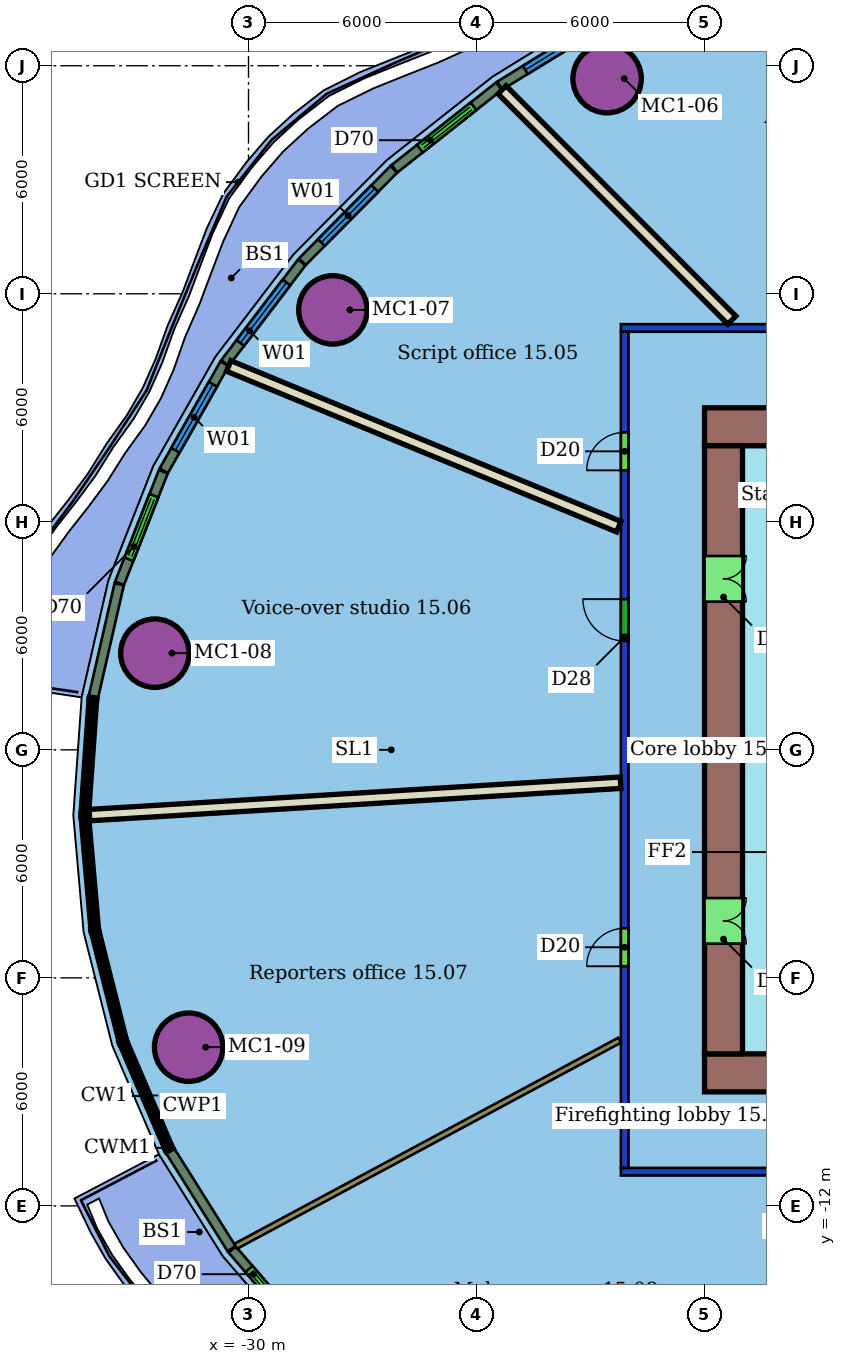
"""IFC4 building model, lengths in metres.
Left out: names, types, materials, properties, quantities, classifications, styles, units other than length and angle.
Written with IfcOpenShell. Run it as: python <this file> out.ifc"""

import sys

from ifc_helpers import new_model, si_unit, direction, frame, frame_2d, origin, origin_2d, place, context, subcontext, project, spatial, rectangle, hollow_circle, extrude, element, fill, save


model = new_model("IFC4")
c1 = context("Model", 3, precision=1e-05, world=origin(), true_north=direction((0.0, 1.0)))
c2 = subcontext(c1, "Body", "Model", "MODEL_VIEW")
j1 = project(units=[si_unit("LENGTHUNIT", "METRE"), si_unit("PLANEANGLEUNIT", "RADIAN")], contexts=[c1])
p1 = place(None, origin())
s1 = spatial("IfcSite", under=j1, at=p1, CompositionType="ELEMENT")
p2 = place(p1, origin())
s2 = spatial("IfcBuilding", under=s1, at=p2, CompositionType="ELEMENT")
p3 = place(p2, frame((0.0, 0.0, 73.0)))
s3 = spatial("IfcBuildingStorey", under=s2, at=p3, CompositionType="ELEMENT", Elevation=73.0)
for number, where, z_axis, x_axis in (
    (1, (-20.563, 17.66, 0.0), (0.0, 0.0, 1.0), (1.0, 0.0, 0.0)),
    (2, (-27.78, 11.576, 0.0), (0.0, 0.0, 1.0), (1.0, 0.0, 0.0)),
    (3, (-32.464, 2.543, 0.0), (0.0, 0.0, 1.0), (1.0, 0.0, 0.0)),
    (4, (-31.575, -7.824, 0.0), (0.0, 0.0, 1.0), (1.0, 0.0, 0.0)),
):
    element("IfcColumn", number, at=place(p3, frame(where, z_axis=z_axis, x_axis=x_axis)), inside=s3, PredefinedType="COLUMN", context=c2, shape_type="SweptSolid", body=[
        extrude(hollow_circle(Radius=0.9, WallThickness=0.06, at=origin_2d()), origin(), (0.0, 0.0, 1.0), 3.55),
    ])
p4 = place(p3, frame((8.2, -11.1, 0.0), z_axis=(0.0, 0.0, 1.0), x_axis=(-1.0, 0.0, 0.0)))
e5 = element("IfcWall", 5, at=p4, inside=s3, PredefinedType="PARTITIONING", context=c2, shape_type="SweptSolid", body=[
    extrude(rectangle(XDim=28.4, YDim=0.2, at=frame_2d((14.2, 0.0))), origin(), (0.0, 0.0, 1.0), 2.85),
])
p5 = place(p4, frame((23.619, 0.0, 0.0)))
e6 = element("IfcOpeningElement", 6, at=p5, cuts=e5, PredefinedType="OPENING", context=c2, shape_type="SweptSolid", body=[
    extrude(rectangle(XDim=0.9, YDim=2.1, at=frame_2d((0.45, 1.05))), frame((0.0, 0.11, 0.0), z_axis=(0.0, -1.0, 0.0), x_axis=(1.0, 0.0, 0.0)), (0.0, 0.0, 1.0), 0.22),
])
p6 = place(p4, frame((18.435, 0.0, 0.0)))
e7 = element("IfcOpeningElement", 7, at=p6, cuts=e5, PredefinedType="OPENING", context=c2, shape_type="SweptSolid", body=[
    extrude(rectangle(XDim=1.1, YDim=2.1, at=frame_2d((0.55, 1.05))), frame((0.0, 0.11, 0.0), z_axis=(0.0, -1.0, 0.0), x_axis=(1.0, 0.0, 0.0)), (0.0, 0.0, 1.0), 0.22),
])
p7 = place(p4, frame((9.94, 0.0, 0.0)))
e8 = element("IfcOpeningElement", 8, at=p7, cuts=e5, PredefinedType="OPENING", context=c2, shape_type="SweptSolid", body=[
    extrude(rectangle(XDim=1.0, YDim=2.1, at=frame_2d((0.5, 1.05))), frame((0.0, 0.11, 0.0), z_axis=(0.0, -1.0, 0.0), x_axis=(1.0, 0.0, 0.0)), (0.0, 0.0, 1.0), 0.22),
])
p8 = place(p4, frame((4.945, 0.0, 0.0)))
e9 = element("IfcOpeningElement", 9, at=p8, cuts=e5, PredefinedType="OPENING", context=c2, shape_type="SweptSolid", body=[
    extrude(rectangle(XDim=1.0, YDim=2.1, at=frame_2d((0.5, 1.05))), frame((0.0, 0.11, 0.0), z_axis=(0.0, -1.0, 0.0), x_axis=(1.0, 0.0, 0.0)), (0.0, 0.0, 1.0), 0.22),
])
p9 = place(p3, frame((-20.1, -11.0, 0.0), z_axis=(0.0, 0.0, 1.0), x_axis=(0.0, 1.0, 0.0)))
e10 = element("IfcWall", 10, at=p9, inside=s3, PredefinedType="PARTITIONING", context=c2, shape_type="SweptSolid", body=[
    extrude(rectangle(XDim=22.0, YDim=0.2, at=frame_2d((11.0, 0.0))), origin(), (0.0, 0.0, 1.0), 2.85),
])
p10 = place(p9, frame((18.354, 0.0, 0.0)))
e11 = element("IfcOpeningElement", 11, at=p10, cuts=e10, PredefinedType="OPENING", context=c2, shape_type="SweptSolid", body=[
    extrude(rectangle(XDim=1.0, YDim=2.1, at=frame_2d((0.5, 1.05))), frame((0.0, 0.11, 0.0), z_axis=(0.0, -1.0, 0.0), x_axis=(1.0, 0.0, 0.0)), (0.0, 0.0, 1.0), 0.22),
])
p11 = place(p9, frame((13.865, 0.0, 0.0)))
e12 = element("IfcOpeningElement", 12, at=p11, cuts=e10, PredefinedType="OPENING", context=c2, shape_type="SweptSolid", body=[
    extrude(rectangle(XDim=1.1, YDim=2.1, at=frame_2d((0.55, 1.05))), frame((0.0, 0.11, 0.0), z_axis=(0.0, -1.0, 0.0), x_axis=(1.0, 0.0, 0.0)), (0.0, 0.0, 1.0), 0.22),
])
p12 = place(p9, frame((5.305, 0.0, 0.0)))
e13 = element("IfcOpeningElement", 13, at=p12, cuts=e10, PredefinedType="OPENING", context=c2, shape_type="SweptSolid", body=[
    extrude(rectangle(XDim=1.0, YDim=2.1, at=frame_2d((0.5, 1.05))), frame((0.0, 0.11, 0.0), z_axis=(0.0, -1.0, 0.0), x_axis=(1.0, 0.0, 0.0)), (0.0, 0.0, 1.0), 0.22),
])
p13 = place(p3, frame((-20.2, 11.1, 0.0), z_axis=(0.0, 0.0, 1.0), x_axis=(1.0, 0.0, 0.0)))
e14 = element("IfcWall", 14, at=p13, inside=s3, PredefinedType="PARTITIONING", context=c2, shape_type="SweptSolid", body=[
    extrude(rectangle(XDim=28.4, YDim=0.2, at=frame_2d((14.2, 0.0))), origin(), (0.0, 0.0, 1.0), 2.85),
])
p14 = place(p13, frame((25.176, 0.0, 0.0)))
e15 = element("IfcOpeningElement", 15, at=p14, cuts=e14, PredefinedType="OPENING", context=c2, shape_type="SweptSolid", body=[
    extrude(rectangle(XDim=1.2, YDim=2.1, at=frame_2d((0.6, 1.05))), frame((0.0, 0.11, 0.0), z_axis=(0.0, -1.0, 0.0), x_axis=(1.0, 0.0, 0.0)), (0.0, 0.0, 1.0), 0.22),
])
p15 = place(p13, frame((19.498, 0.0, 0.0)))
e16 = element("IfcOpeningElement", 16, at=p15, cuts=e14, PredefinedType="OPENING", context=c2, shape_type="SweptSolid", body=[
    extrude(rectangle(XDim=1.0, YDim=2.1, at=frame_2d((0.5, 1.05))), frame((0.0, 0.11, 0.0), z_axis=(0.0, -1.0, 0.0), x_axis=(1.0, 0.0, 0.0)), (0.0, 0.0, 1.0), 0.22),
])
p16 = place(p13, frame((15.796, 0.0, 0.0)))
e17 = element("IfcOpeningElement", 17, at=p16, cuts=e14, PredefinedType="OPENING", context=c2, shape_type="SweptSolid", body=[
    extrude(rectangle(XDim=0.9, YDim=2.1, at=frame_2d((0.45, 1.05))), frame((0.0, 0.11, 0.0), z_axis=(0.0, -1.0, 0.0), x_axis=(1.0, 0.0, 0.0)), (0.0, 0.0, 1.0), 0.22),
])
p17 = place(p13, frame((9.82, 0.0, 0.0)))
e18 = element("IfcOpeningElement", 18, at=p17, cuts=e14, PredefinedType="OPENING", context=c2, shape_type="SweptSolid", body=[
    extrude(rectangle(XDim=1.1, YDim=2.1, at=frame_2d((0.55, 1.05))), frame((0.0, 0.11, 0.0), z_axis=(0.0, -1.0, 0.0), x_axis=(1.0, 0.0, 0.0)), (0.0, 0.0, 1.0), 0.22),
])
p18 = place(p3, frame((-23.328, 17.366, 0.0), z_axis=(0.0, 0.0, 1.0), x_axis=(0.706322145965, -0.707890546709, 0.0)))
e19 = element("IfcWall", 19, at=p18, inside=s3, PredefinedType="PARTITIONING", context=c2, shape_type="SweptSolid", body=[
    extrude(rectangle(XDim=8.562, YDim=0.3, at=frame_2d((4.281, 0.0))), origin(), (0.0, 0.0, 1.0), 3.55),
])
p19 = place(p3, frame((-30.52, 10.1, 0.0), z_axis=(0.0, 0.0, 1.0), x_axis=(0.924634361227, -0.380856006962, 0.0)))
e20 = element("IfcWall", 20, at=p19, inside=s3, PredefinedType="PARTITIONING", context=c2, shape_type="SweptSolid", body=[
    extrude(rectangle(XDim=11.099, YDim=0.3, at=frame_2d((5.55, 0.0))), origin(), (0.0, 0.0, 1.0), 3.55),
])
p20 = place(p3, frame((-34.185, -1.718, 0.0), z_axis=(0.0, 0.0, 1.0), x_axis=(0.998148789729, 0.060819351872, 0.0)))
e21 = element("IfcWall", 21, at=p20, inside=s3, PredefinedType="PARTITIONING", context=c2, shape_type="SweptSolid", body=[
    extrude(rectangle(XDim=14.001, YDim=0.3, at=frame_2d((7.001, 0.0))), origin(), (0.0, 0.0, 1.0), 3.55),
])
p21 = place(p3, frame((-30.337, -13.063, 0.0), z_axis=(0.0, 0.0, 1.0), x_axis=(0.881100754634, 0.472928599456, 0.0)))
e22 = element("IfcWall", 22, at=p21, inside=s3, PredefinedType="PARTITIONING", context=c2, shape_type="SweptSolid", body=[
    extrude(rectangle(XDim=11.465, YDim=0.15, at=frame_2d((5.732, 0.0))), origin(), (0.0, 0.0, 1.0), 3.55),
])
p22 = place(p3, frame((-19.973, -20.949, 0.0), z_axis=(0.0, 0.0, 1.0), x_axis=(0.554894141309, 0.831920964961, 0.0)))
e23 = element("IfcWall", 23, at=p22, inside=s3, PredefinedType="PARTITIONING", context=c2, shape_type="SweptSolid", body=[
    extrude(rectangle(XDim=11.619, YDim=0.3, at=frame_2d((5.81, 0.0))), origin(), (0.0, 0.0, 1.0), 3.55),
])
p23 = place(p3, frame((-20.341, 19.351, 0.0), z_axis=(0.0, 0.0, 1.0), x_axis=(-0.851723868461, -0.523990889132, 0.0)))
e24 = element("IfcWall", 24, at=p23, inside=s3, PredefinedType="SOLIDWALL", context=c2, shape_type="SweptSolid", body=[
    extrude(rectangle(XDim=3.58, YDim=0.25, at=frame_2d((1.79, 0.0))), origin(), (0.0, 0.0, 1.0), 3.15),
])
p24 = place(p23, frame((0.79, 0.0, 0.8)))
e25 = element("IfcOpeningElement", 25, at=p24, cuts=e24, PredefinedType="OPENING", context=c2, shape_type="SweptSolid", body=[
    extrude(rectangle(XDim=2.0, YDim=2.2, at=frame_2d((1.0, 1.1))), frame((0.0, 0.135, 0.0), z_axis=(0.0, -1.0, 0.0), x_axis=(1.0, 0.0, 0.0)), (0.0, 0.0, 1.0), 0.27),
])
p25 = place(p3, frame((-23.408, 17.462, 0.0), z_axis=(0.0, 0.0, 1.0), x_axis=(-0.784747250061, -0.619815902928, 0.0)))
e26 = element("IfcWall", 26, at=p25, inside=s3, PredefinedType="SOLIDWALL", context=c2, shape_type="SweptSolid", body=[
    extrude(rectangle(XDim=3.505, YDim=0.25, at=frame_2d((1.752, 0.0))), origin(), (0.0, 0.0, 1.0), 3.15),
])
p26 = place(p25, frame((0.853, 0.0, 0.0)))
e27 = element("IfcOpeningElement", 27, at=p26, cuts=e26, PredefinedType="OPENING", context=c2, shape_type="SweptSolid", body=[
    extrude(rectangle(XDim=1.8, YDim=2.4, at=frame_2d((0.9, 1.2))), frame((0.0, 0.135, 0.0), z_axis=(0.0, -1.0, 0.0), x_axis=(1.0, 0.0, 0.0)), (0.0, 0.0, 1.0), 0.27),
])
p27 = place(p3, frame((-26.177, 15.274, 0.0), z_axis=(0.0, 0.0, 1.0), x_axis=(-0.703348795403, -0.710844900105, 0.0)))
e28 = element("IfcWall", 28, at=p27, inside=s3, PredefinedType="SOLIDWALL", context=c2, shape_type="SweptSolid", body=[
    extrude(rectangle(XDim=3.42, YDim=0.25, at=frame_2d((1.71, 0.0))), origin(), (0.0, 0.0, 1.0), 3.15),
])
p28 = place(p27, frame((0.71, 0.0, 0.8)))
e29 = element("IfcOpeningElement", 29, at=p28, cuts=e28, PredefinedType="OPENING", context=c2, shape_type="SweptSolid", body=[
    extrude(rectangle(XDim=2.0, YDim=2.2, at=frame_2d((1.0, 1.1))), frame((0.0, 0.135, 0.0), z_axis=(0.0, -1.0, 0.0), x_axis=(1.0, 0.0, 0.0)), (0.0, 0.0, 1.0), 0.27),
])
p29 = place(p3, frame((-28.598, 12.825, 0.0), z_axis=(0.0, 0.0, 1.0), x_axis=(-0.606551340404, -0.795044320433, 0.0)))
e30 = element("IfcWall", 30, at=p29, inside=s3, PredefinedType="SOLIDWALL", context=c2, shape_type="SweptSolid", body=[
    extrude(rectangle(XDim=3.329, YDim=0.25, at=frame_2d((1.664, 0.0))), origin(), (0.0, 0.0, 1.0), 3.15),
])
p30 = place(p29, frame((0.664, 0.0, 0.8)))
e31 = element("IfcOpeningElement", 31, at=p30, cuts=e30, PredefinedType="OPENING", context=c2, shape_type="SweptSolid", body=[
    extrude(rectangle(XDim=2.0, YDim=2.2, at=frame_2d((1.0, 1.1))), frame((0.0, 0.135, 0.0), z_axis=(0.0, -1.0, 0.0), x_axis=(1.0, 0.0, 0.0)), (0.0, 0.0, 1.0), 0.27),
])
p31 = place(p3, frame((-30.63, 10.158, 0.0), z_axis=(0.0, 0.0, 1.0), x_axis=(-0.49387210609, -0.86953455528, 0.0)))
e32 = element("IfcWall", 32, at=p31, inside=s3, PredefinedType="SOLIDWALL", context=c2, shape_type="SweptSolid", body=[
    extrude(rectangle(XDim=3.239, YDim=0.25, at=frame_2d((1.619, 0.0))), origin(), (0.0, 0.0, 1.0), 3.15),
])
p32 = place(p31, frame((0.619, 0.0, 0.8)))
e33 = element("IfcOpeningElement", 33, at=p32, cuts=e32, PredefinedType="OPENING", context=c2, shape_type="SweptSolid", body=[
    extrude(rectangle(XDim=2.0, YDim=2.2, at=frame_2d((1.0, 1.1))), frame((0.0, 0.135, 0.0), z_axis=(0.0, -1.0, 0.0), x_axis=(1.0, 0.0, 0.0)), (0.0, 0.0, 1.0), 0.27),
])
p33 = place(p3, frame((-32.241, 7.319, 0.0), z_axis=(0.0, 0.0, 1.0), x_axis=(-0.365472806346, -0.930822017263, 0.0)))
e34 = element("IfcWall", 34, at=p33, inside=s3, PredefinedType="SOLIDWALL", context=c2, shape_type="SweptSolid", body=[
    extrude(rectangle(XDim=3.155, YDim=0.25, at=frame_2d((1.578, 0.0))), origin(), (0.0, 0.0, 1.0), 3.15),
])
p34 = place(p33, frame((0.677, 0.0, 0.0)))
e35 = element("IfcOpeningElement", 35, at=p34, cuts=e34, PredefinedType="OPENING", context=c2, shape_type="SweptSolid", body=[
    extrude(rectangle(XDim=1.8, YDim=2.4, at=frame_2d((0.9, 1.2))), frame((0.0, 0.135, 0.0), z_axis=(0.0, -1.0, 0.0), x_axis=(1.0, 0.0, 0.0)), (0.0, 0.0, 1.0), 0.27),
])
for number, where, z_axis, x_axis in (
    (36, (-33.402, 4.357, 0.0), (0.0, 0.0, 1.0), (-0.223, -0.975, 0.0)),
    (37, (-32.062, -10.548, 0.0), (0.0, 0.0, 1.0), (0.531, -0.847, 0.0)),
):
    element("IfcWall", number, at=place(p3, frame(where, z_axis=z_axis, x_axis=x_axis)), inside=s3, PredefinedType="SOLIDWALL", context=c2, shape_type="SweptSolid", body=[
        extrude(rectangle(XDim=3.044, YDim=0.25, at=frame_2d((1.522, 0.0))), origin(), (0.0, 0.0, 1.0), 3.15),
    ])
p35 = place(p3, frame((-30.429, -13.147, 0.0), z_axis=(0.0, 0.0, 1.0), x_axis=(0.651320140898, -0.75880305354, 0.0)))
e38 = element("IfcWall", 38, at=p35, inside=s3, PredefinedType="SOLIDWALL", context=c2, shape_type="SweptSolid", body=[
    extrude(rectangle(XDim=3.155, YDim=0.25, at=frame_2d((1.578, 0.0))), origin(), (0.0, 0.0, 1.0), 3.15),
])
p36 = place(p35, frame((0.677, 0.0, 0.0)))
e39 = element("IfcOpeningElement", 39, at=p36, cuts=e38, PredefinedType="OPENING", context=c2, shape_type="SweptSolid", body=[
    extrude(rectangle(XDim=1.8, YDim=2.4, at=frame_2d((0.9, 1.2))), frame((0.0, 0.135, 0.0), z_axis=(0.0, -1.0, 0.0), x_axis=(1.0, 0.0, 0.0)), (0.0, 0.0, 1.0), 0.27),
])
p37 = place(p3, frame((-6.0, 8.5, 0.0), z_axis=(0.0, 0.0, 1.0), x_axis=(-1.0, 0.0, 0.0)))
e40 = element("IfcWall", 40, at=p37, inside=s3, PredefinedType="SHEAR", context=c2, shape_type="SweptSolid", body=[
    extrude(rectangle(XDim=12.0, YDim=1.0, at=frame_2d((6.0, 0.0))), origin(), (0.0, 0.0, 1.0), 3.4),
])
p38 = place(p37, frame((5.2, 0.0, 0.0)))
e41 = element("IfcOpeningElement", 41, at=p38, cuts=e40, PredefinedType="OPENING", context=c2, shape_type="SweptSolid", body=[
    extrude(rectangle(XDim=1.2, YDim=2.1, at=frame_2d((0.6, 1.05))), frame((0.0, 0.51, 0.0), z_axis=(0.0, -1.0, 0.0), x_axis=(1.0, 0.0, 0.0)), (0.0, 0.0, 1.0), 1.02),
])
p39 = place(p3, frame((-18.0, -8.5, 0.0), z_axis=(0.0, 0.0, 1.0), x_axis=(1.0, 0.0, 0.0)))
e42 = element("IfcWall", 42, at=p39, inside=s3, PredefinedType="SHEAR", context=c2, shape_type="SweptSolid", body=[
    extrude(rectangle(XDim=24.0, YDim=1.0, at=frame_2d((12.0, 0.0))), origin(), (0.0, 0.0, 1.0), 3.4),
])
p40 = place(p39, frame((6.0, 0.0, 0.0)))
e43 = element("IfcOpeningElement", 43, at=p40, cuts=e42, PredefinedType="OPENING", context=c2, shape_type="SweptSolid", body=[
    extrude(rectangle(XDim=1.2, YDim=2.1, at=frame_2d((0.6, 1.05))), frame((0.0, 0.51, 0.0), z_axis=(0.0, -1.0, 0.0), x_axis=(1.0, 0.0, 0.0)), (0.0, 0.0, 1.0), 1.02),
])
p41 = place(p3, frame((-17.5, 8.0, 0.0), z_axis=(0.0, 0.0, 1.0), x_axis=(0.0, -1.0, 0.0)))
e44 = element("IfcWall", 44, at=p41, inside=s3, PredefinedType="SHEAR", context=c2, shape_type="SweptSolid", body=[
    extrude(rectangle(XDim=16.0, YDim=1.0, at=frame_2d((8.0, 0.0))), origin(), (0.0, 0.0, 1.0), 3.4),
])
p42 = place(p41, frame((11.9, 0.0, 0.0)))
e45 = element("IfcOpeningElement", 45, at=p42, cuts=e44, PredefinedType="OPENING", context=c2, shape_type="SweptSolid", body=[
    extrude(rectangle(XDim=1.2, YDim=2.1, at=frame_2d((0.6, 1.05))), frame((0.0, 0.51, 0.0), z_axis=(0.0, -1.0, 0.0), x_axis=(1.0, 0.0, 0.0)), (0.0, 0.0, 1.0), 1.02),
])
p43 = place(p41, frame((2.9, 0.0, 0.0)))
e46 = element("IfcOpeningElement", 46, at=p43, cuts=e44, PredefinedType="OPENING", context=c2, shape_type="SweptSolid", body=[
    extrude(rectangle(XDim=1.2, YDim=2.1, at=frame_2d((0.6, 1.05))), frame((0.0, 0.51, 0.0), z_axis=(0.0, -1.0, 0.0), x_axis=(1.0, 0.0, 0.0)), (0.0, 0.0, 1.0), 1.02),
])
p44 = place(p10, origin())
e47 = element("IfcDoor", 47, at=p44, inside=s3, OperationType="SINGLE_SWING_LEFT", PredefinedType="DOOR", context=c2, shape_type="SweptSolid", body=[
    extrude(rectangle(XDim=1.0, YDim=2.1, at=frame_2d((0.5, 1.05))), frame((0.0, 0.025, 0.0), z_axis=(0.0, -1.0, 0.0), x_axis=(1.0, 0.0, 0.0)), (0.0, 0.0, 1.0), 0.05),
])
fill(e11, e47)
p45 = place(p11, origin())
e48 = element("IfcDoor", 48, at=p45, inside=s3, OperationType="SINGLE_SWING_RIGHT", PredefinedType="DOOR", context=c2, shape_type="SweptSolid", body=[
    extrude(rectangle(XDim=1.1, YDim=2.1, at=frame_2d((0.55, 1.05))), frame((0.0, 0.025, 0.0), z_axis=(0.0, -1.0, 0.0), x_axis=(1.0, 0.0, 0.0)), (0.0, 0.0, 1.0), 0.05),
])
fill(e12, e48)
p46 = place(p12, origin())
e49 = element("IfcDoor", 49, at=p46, inside=s3, OperationType="SINGLE_SWING_LEFT", PredefinedType="DOOR", context=c2, shape_type="SweptSolid", body=[
    extrude(rectangle(XDim=1.0, YDim=2.1, at=frame_2d((0.5, 1.05))), frame((0.0, 0.025, 0.0), z_axis=(0.0, -1.0, 0.0), x_axis=(1.0, 0.0, 0.0)), (0.0, 0.0, 1.0), 0.05),
])
fill(e13, e49)
p47 = place(p24, origin())
e50 = element("IfcWindow", 50, at=p47, inside=s3, PartitioningType="SINGLE_PANEL", PredefinedType="WINDOW", context=c2, shape_type="SweptSolid", body=[
    extrude(rectangle(XDim=2.0, YDim=2.2, at=frame_2d((1.0, 1.1))), frame((0.0, 0.03, 0.0), z_axis=(0.0, -1.0, 0.0), x_axis=(1.0, 0.0, 0.0)), (0.0, 0.0, 1.0), 0.06),
])
fill(e25, e50)
p48 = place(p26, origin())
e51 = element("IfcDoor", 51, at=p48, inside=s3, OperationType="DOUBLE_DOOR_SLIDING", PredefinedType="DOOR", context=c2, shape_type="SweptSolid", body=[
    extrude(rectangle(XDim=1.8, YDim=2.4, at=frame_2d((0.9, 1.2))), frame((0.0, 0.025, 0.0), z_axis=(0.0, -1.0, 0.0), x_axis=(1.0, 0.0, 0.0)), (0.0, 0.0, 1.0), 0.05),
])
fill(e27, e51)
p49 = place(p28, origin())
e52 = element("IfcWindow", 52, at=p49, inside=s3, PartitioningType="SINGLE_PANEL", PredefinedType="WINDOW", context=c2, shape_type="SweptSolid", body=[
    extrude(rectangle(XDim=2.0, YDim=2.2, at=frame_2d((1.0, 1.1))), frame((0.0, 0.03, 0.0), z_axis=(0.0, -1.0, 0.0), x_axis=(1.0, 0.0, 0.0)), (0.0, 0.0, 1.0), 0.06),
])
fill(e29, e52)
p50 = place(p30, origin())
e53 = element("IfcWindow", 53, at=p50, inside=s3, PartitioningType="SINGLE_PANEL", PredefinedType="WINDOW", context=c2, shape_type="SweptSolid", body=[
    extrude(rectangle(XDim=2.0, YDim=2.2, at=frame_2d((1.0, 1.1))), frame((0.0, 0.03, 0.0), z_axis=(0.0, -1.0, 0.0), x_axis=(1.0, 0.0, 0.0)), (0.0, 0.0, 1.0), 0.06),
])
fill(e31, e53)
p51 = place(p32, origin())
e54 = element("IfcWindow", 54, at=p51, inside=s3, PartitioningType="SINGLE_PANEL", PredefinedType="WINDOW", context=c2, shape_type="SweptSolid", body=[
    extrude(rectangle(XDim=2.0, YDim=2.2, at=frame_2d((1.0, 1.1))), frame((0.0, 0.03, 0.0), z_axis=(0.0, -1.0, 0.0), x_axis=(1.0, 0.0, 0.0)), (0.0, 0.0, 1.0), 0.06),
])
fill(e33, e54)
p52 = place(p34, origin())
e55 = element("IfcDoor", 55, at=p52, inside=s3, OperationType="DOUBLE_DOOR_SLIDING", PredefinedType="DOOR", context=c2, shape_type="SweptSolid", body=[
    extrude(rectangle(XDim=1.8, YDim=2.4, at=frame_2d((0.9, 1.2))), frame((0.0, 0.025, 0.0), z_axis=(0.0, -1.0, 0.0), x_axis=(1.0, 0.0, 0.0)), (0.0, 0.0, 1.0), 0.05),
])
fill(e35, e55)
p53 = place(p36, origin())
e56 = element("IfcDoor", 56, at=p53, inside=s3, OperationType="DOUBLE_DOOR_SLIDING", PredefinedType="DOOR", context=c2, shape_type="SweptSolid", body=[
    extrude(rectangle(XDim=1.8, YDim=2.4, at=frame_2d((0.9, 1.2))), frame((0.0, 0.025, 0.0), z_axis=(0.0, -1.0, 0.0), x_axis=(1.0, 0.0, 0.0)), (0.0, 0.0, 1.0), 0.05),
])
fill(e39, e56)
p54 = place(p42, origin())
e57 = element("IfcDoor", 57, at=p54, inside=s3, OperationType="DOUBLE_DOOR_SINGLE_SWING", PredefinedType="NOTDEFINED", context=c2, shape_type="SweptSolid", body=[
    extrude(rectangle(XDim=1.2, YDim=2.1, at=frame_2d((0.6, 1.05))), frame((0.0, 0.025, 0.0), z_axis=(0.0, -1.0, 0.0), x_axis=(1.0, 0.0, 0.0)), (0.0, 0.0, 1.0), 0.05),
])
fill(e45, e57)
p55 = place(p43, origin())
e58 = element("IfcDoor", 58, at=p55, inside=s3, OperationType="DOUBLE_DOOR_SINGLE_SWING", PredefinedType="NOTDEFINED", context=c2, shape_type="SweptSolid", body=[
    extrude(rectangle(XDim=1.2, YDim=2.1, at=frame_2d((0.6, 1.05))), frame((0.0, 0.025, 0.0), z_axis=(0.0, -1.0, 0.0), x_axis=(1.0, 0.0, 0.0)), (0.0, 0.0, 1.0), 0.05),
])
fill(e46, e58)
save(model, sys.argv[1])
